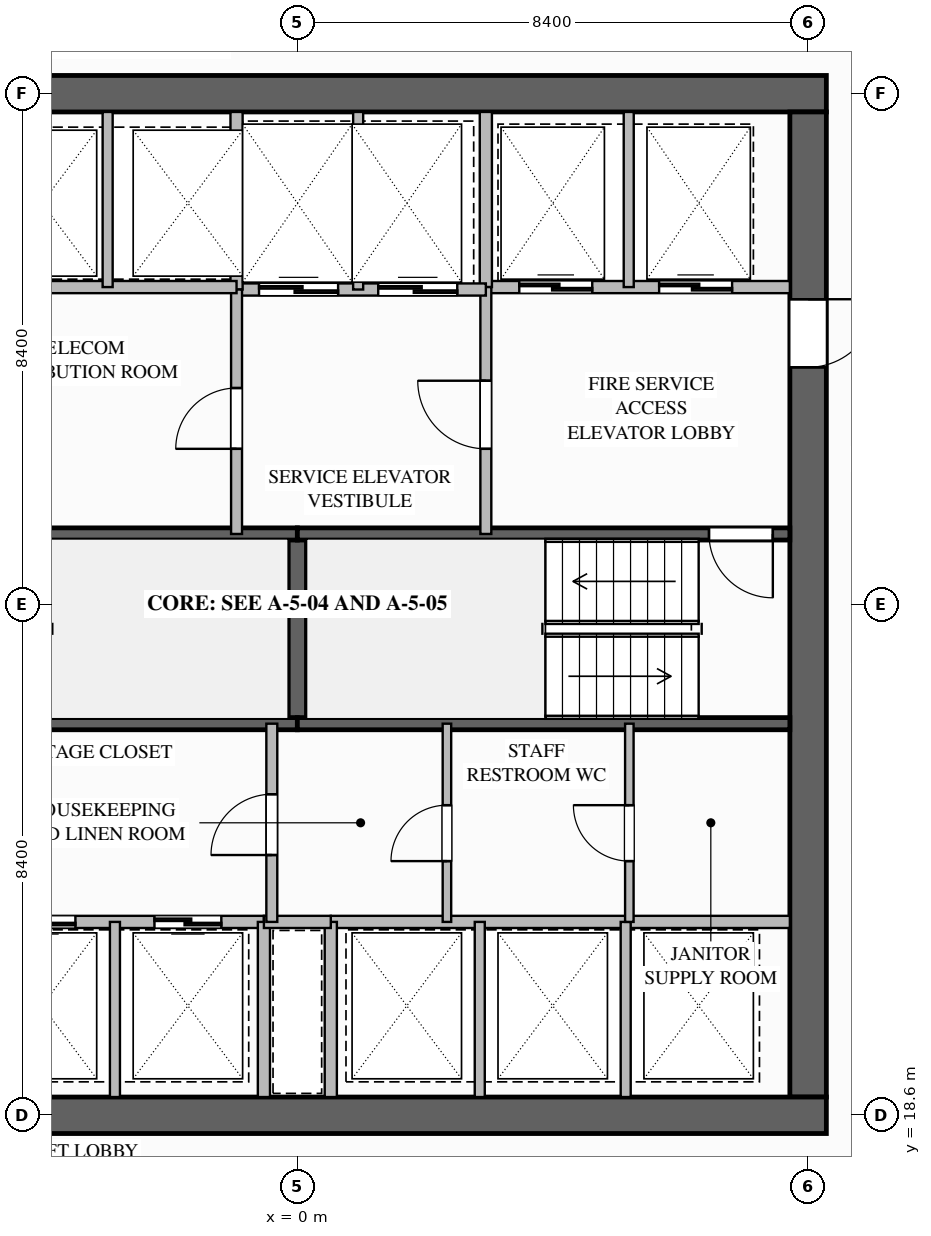
"""IFC4 building model, lengths in metres.
Left out: names, types, materials, properties, quantities, classifications, styles, units other than length and angle.
Written with IfcOpenShell. Run it as: python <this file> out.ifc"""

import sys

from ifc_helpers import new_model, si_unit, direction, frame, frame_2d, origin, place, context, subcontext, project, spatial, rectangle, extrude, element, fill, save


model = new_model("IFC4")
c1 = context("Model", 3, precision=1e-05, world=origin(), true_north=direction((0.0, 1.0)))
c2 = subcontext(c1, "Body", "Model", "MODEL_VIEW")
j1 = project(units=[si_unit("LENGTHUNIT", "METRE"), si_unit("PLANEANGLEUNIT", "RADIAN")], contexts=[c1])
p1 = place(None, origin())
s1 = spatial("IfcSite", under=j1, at=p1, CompositionType="ELEMENT")
p2 = place(p1, origin())
s2 = spatial("IfcBuilding", under=s1, at=p2, CompositionType="ELEMENT")
p3 = place(p2, frame((0.0, 0.0, 36.7)))
s3 = spatial("IfcBuildingStorey", under=s2, at=p3, CompositionType="ELEMENT", Elevation=36.7)
p4 = place(p3, frame((-8.7, 35.4, 0.0), z_axis=(0.0, 0.0, 1.0), x_axis=(1.0, 0.0, 0.0)))
e1 = element("IfcWall", 1, at=p4, inside=s3, PredefinedType="SHEAR", context=c2, shape_type="SweptSolid", body=[
    extrude(rectangle(XDim=17.4, YDim=0.6, at=frame_2d((8.7, 0.0))), origin(), (0.0, 0.0, 1.0), 3.5),
])
p5 = place(p3, frame((8.4, 35.1, 0.0), z_axis=(0.0, 0.0, 1.0), x_axis=(0.0, -1.0, 0.0)))
e2 = element("IfcWall", 2, at=p5, inside=s3, PredefinedType="SHEAR", context=c2, shape_type="SweptSolid", body=[
    extrude(rectangle(XDim=16.2, YDim=0.6, at=frame_2d((8.1, 0.0))), origin(), (0.0, 0.0, 1.0), 3.5),
])
p6 = place(p5, frame((3.08, 0.0, 0.0)))
e3 = element("IfcOpeningElement", 3, at=p6, cuts=e2, PredefinedType="OPENING", context=c2, shape_type="SweptSolid", body=[
    extrude(rectangle(XDim=1.12, YDim=2.1, at=frame_2d((0.56, 1.05))), frame((0.0, 0.31, 0.0), z_axis=(0.0, -1.0, 0.0), x_axis=(1.0, 0.0, 0.0)), (0.0, 0.0, 1.0), 0.62),
])
p7 = place(p3, frame((8.7, 18.6, 0.0), z_axis=(0.0, 0.0, 1.0), x_axis=(-1.0, 0.0, 0.0)))
e4 = element("IfcWall", 4, at=p7, inside=s3, PredefinedType="SHEAR", context=c2, shape_type="SweptSolid", body=[
    extrude(rectangle(XDim=17.4, YDim=0.6, at=frame_2d((8.7, 0.0))), origin(), (0.0, 0.0, 1.0), 3.5),
])
p8 = place(p3, frame((0.0, 25.04, 0.0), z_axis=(0.0, 0.0, 1.0), x_axis=(0.0, 1.0, 0.0)))
e5 = element("IfcWall", 5, at=p8, inside=s3, PredefinedType="SOLIDWALL", context=c2, shape_type="SweptSolid", body=[
    extrude(rectangle(XDim=3.12, YDim=0.3, at=frame_2d((1.56, 0.0))), origin(), (0.0, 0.0, 1.0), 3.24),
])
p9 = place(p3, frame((-8.1, 25.04, 0.0), z_axis=(0.0, 0.0, 1.0), x_axis=(1.0, 0.0, 0.0)))
e6 = element("IfcWall", 6, at=p9, inside=s3, PredefinedType="SOLIDWALL", context=c2, shape_type="SweptSolid", body=[
    extrude(rectangle(XDim=8.1, YDim=0.2, at=frame_2d((4.05, 0.0))), origin(), (0.0, 0.0, 1.0), 3.24),
])
p10 = place(p9, frame((0.28, 0.0, 0.0)))
e7 = element("IfcOpeningElement", 7, at=p10, cuts=e6, PredefinedType="OPENING", context=c2, shape_type="SweptSolid", body=[
    extrude(rectangle(XDim=1.05, YDim=2.1, at=frame_2d((0.525, 1.05))), frame((0.0, 0.11, 0.0), z_axis=(0.0, -1.0, 0.0), x_axis=(1.0, 0.0, 0.0)), (0.0, 0.0, 1.0), 0.22),
])
for number, where, z_axis, x_axis in (
    (8, (-8.1, 28.16, 0.0), (0.0, 0.0, 1.0), (1.0, 0.0, 0.0)),
    (9, (0.0, 25.04, 0.0), (0.0, 0.0, 1.0), (1.0, 0.0, 0.0)),
):
    element("IfcWall", number, at=place(p3, frame(where, z_axis=z_axis, x_axis=x_axis)), inside=s3, PredefinedType="SOLIDWALL", context=c2, shape_type="SweptSolid", body=[
        extrude(rectangle(XDim=8.1, YDim=0.2, at=frame_2d((4.05, 0.0))), origin(), (0.0, 0.0, 1.0), 3.24),
    ])
p11 = place(p3, frame((8.1, 28.16, 0.0), z_axis=(0.0, 0.0, 1.0), x_axis=(-1.0, 0.0, 0.0)))
e10 = element("IfcWall", 10, at=p11, inside=s3, PredefinedType="SOLIDWALL", context=c2, shape_type="SweptSolid", body=[
    extrude(rectangle(XDim=8.1, YDim=0.2, at=frame_2d((4.05, 0.0))), origin(), (0.0, 0.0, 1.0), 3.24),
])
p12 = place(p11, frame((0.28, 0.0, 0.0)))
e11 = element("IfcOpeningElement", 11, at=p12, cuts=e10, PredefinedType="OPENING", context=c2, shape_type="SweptSolid", body=[
    extrude(rectangle(XDim=1.05, YDim=2.1, at=frame_2d((0.525, 1.05))), frame((0.0, 0.11, 0.0), z_axis=(0.0, -1.0, 0.0), x_axis=(1.0, 0.0, 0.0)), (0.0, 0.0, 1.0), 0.22),
])
p13 = place(p3, frame((3.1, 32.22, 0.0), z_axis=(0.0, 0.0, 1.0), x_axis=(1.0, 0.0, 0.0)))
e12 = element("IfcWall", 12, at=p13, inside=s3, PredefinedType="SOLIDWALL", context=c2, shape_type="SweptSolid", body=[
    extrude(rectangle(XDim=5.0, YDim=0.2, at=frame_2d((2.5, 0.0))), origin(), (0.0, 0.0, 1.0), 3.24),
])
p14 = place(p13, frame((0.55, 0.0, 0.0)))
e13 = element("IfcOpeningElement", 13, at=p14, cuts=e12, PredefinedType="OPENING", context=c2, shape_type="SweptSolid", body=[
    extrude(rectangle(XDim=1.2, YDim=2.2, at=frame_2d((0.6, 1.1))), frame((0.0, 0.11, 0.0), z_axis=(0.0, -1.0, 0.0), x_axis=(1.0, 0.0, 0.0)), (0.0, 0.0, 1.0), 0.22),
])
p15 = place(p13, frame((2.85, 0.0, 0.0)))
e14 = element("IfcOpeningElement", 14, at=p15, cuts=e12, PredefinedType="OPENING", context=c2, shape_type="SweptSolid", body=[
    extrude(rectangle(XDim=1.2, YDim=2.2, at=frame_2d((0.6, 1.1))), frame((0.0, 0.11, 0.0), z_axis=(0.0, -1.0, 0.0), x_axis=(1.0, 0.0, 0.0)), (0.0, 0.0, 1.0), 0.22),
])
p16 = place(p3, frame((3.1, 32.22, 0.0), z_axis=(0.0, 0.0, 1.0), x_axis=(0.0, 1.0, 0.0)))
e15 = element("IfcWall", 15, at=p16, inside=s3, PredefinedType="SOLIDWALL", context=c2, shape_type="SweptSolid", body=[
    extrude(rectangle(XDim=2.88, YDim=0.2, at=frame_2d((1.44, 0.0))), origin(), (0.0, 0.0, 1.0), 3.24),
])
p17 = place(p3, frame((5.45, 32.22, 0.0), z_axis=(0.0, 0.0, 1.0), x_axis=(0.0, 1.0, 0.0)))
e16 = element("IfcWall", 16, at=p17, inside=s3, PredefinedType="PARTITIONING", context=c2, shape_type="SweptSolid", body=[
    extrude(rectangle(XDim=2.88, YDim=0.165, at=frame_2d((1.44, 0.0))), origin(), (0.0, 0.0, 1.0), 3.24),
])
p18 = place(p3, frame((3.1, 28.16, 0.0), z_axis=(0.0, 0.0, 1.0), x_axis=(0.0, 1.0, 0.0)))
e17 = element("IfcWall", 17, at=p18, inside=s3, PredefinedType="SOLIDWALL", context=c2, shape_type="SweptSolid", body=[
    extrude(rectangle(XDim=4.06, YDim=0.18, at=frame_2d((2.03, 0.0))), origin(), (0.0, 0.0, 1.0), 3.24),
])
p19 = place(p18, frame((1.4, 0.0, 0.0)))
e18 = element("IfcOpeningElement", 18, at=p19, cuts=e17, PredefinedType="OPENING", context=c2, shape_type="SweptSolid", body=[
    extrude(rectangle(XDim=1.12, YDim=2.1, at=frame_2d((0.56, 1.05))), frame((0.0, 0.1, 0.0), z_axis=(0.0, -1.0, 0.0), x_axis=(1.0, 0.0, 0.0)), (0.0, 0.0, 1.0), 0.2),
])
p20 = place(p3, frame((-1.0, 32.18, 0.0), z_axis=(0.0, 0.0, 1.0), x_axis=(1.0, 0.0, 0.0)))
e19 = element("IfcWall", 19, at=p20, inside=s3, PredefinedType="SOLIDWALL", context=c2, shape_type="SweptSolid", body=[
    extrude(rectangle(XDim=4.1, YDim=0.2, at=frame_2d((2.05, 0.0))), origin(), (0.0, 0.0, 1.0), 3.24),
])
p21 = place(p20, frame((0.37, 0.0, 0.0)))
e20 = element("IfcOpeningElement", 20, at=p21, cuts=e19, PredefinedType="OPENING", context=c2, shape_type="SweptSolid", body=[
    extrude(rectangle(XDim=1.3, YDim=2.2, at=frame_2d((0.65, 1.1))), frame((0.0, 0.11, 0.0), z_axis=(0.0, -1.0, 0.0), x_axis=(1.0, 0.0, 0.0)), (0.0, 0.0, 1.0), 0.22),
])
p22 = place(p20, frame((2.33, 0.0, 0.0)))
e21 = element("IfcOpeningElement", 21, at=p22, cuts=e19, PredefinedType="OPENING", context=c2, shape_type="SweptSolid", body=[
    extrude(rectangle(XDim=1.3, YDim=2.2, at=frame_2d((0.65, 1.1))), frame((0.0, 0.11, 0.0), z_axis=(0.0, -1.0, 0.0), x_axis=(1.0, 0.0, 0.0)), (0.0, 0.0, 1.0), 0.22),
])
p23 = place(p3, frame((-1.0, 32.18, 0.0), z_axis=(0.0, 0.0, 1.0), x_axis=(0.0, 1.0, 0.0)))
e22 = element("IfcWall", 22, at=p23, inside=s3, PredefinedType="SOLIDWALL", context=c2, shape_type="SweptSolid", body=[
    extrude(rectangle(XDim=2.92, YDim=0.2, at=frame_2d((1.46, 0.0))), origin(), (0.0, 0.0, 1.0), 3.24),
])
p24 = place(p3, frame((1.0, 32.18, 0.0), z_axis=(0.0, 0.0, 1.0), x_axis=(0.0, 1.0, 0.0)))
e23 = element("IfcWall", 23, at=p24, inside=s3, PredefinedType="PARTITIONING", context=c2, shape_type="SweptSolid", body=[
    extrude(rectangle(XDim=2.92, YDim=0.165, at=frame_2d((1.46, 0.0))), origin(), (0.0, 0.0, 1.0), 3.24),
])
p25 = place(p3, frame((-1.0, 28.16, 0.0), z_axis=(0.0, 0.0, 1.0), x_axis=(0.0, 1.0, 0.0)))
e24 = element("IfcWall", 24, at=p25, inside=s3, PredefinedType="SOLIDWALL", context=c2, shape_type="SweptSolid", body=[
    extrude(rectangle(XDim=4.02, YDim=0.18, at=frame_2d((2.01, 0.0))), origin(), (0.0, 0.0, 1.0), 3.24),
])
p26 = place(p25, frame((1.4, 0.0, 0.0)))
e25 = element("IfcOpeningElement", 25, at=p26, cuts=e24, PredefinedType="OPENING", context=c2, shape_type="SweptSolid", body=[
    extrude(rectangle(XDim=1.0, YDim=2.1, at=frame_2d((0.5, 1.05))), frame((0.0, 0.1, 0.0), z_axis=(0.0, -1.0, 0.0), x_axis=(1.0, 0.0, 0.0)), (0.0, 0.0, 1.0), 0.2),
])
p27 = place(p3, frame((-8.1, 32.22, 0.0), z_axis=(0.0, 0.0, 1.0), x_axis=(1.0, 0.0, 0.0)))
e26 = element("IfcWall", 26, at=p27, inside=s3, PredefinedType="SOLIDWALL", context=c2, shape_type="SweptSolid", body=[
    extrude(rectangle(XDim=7.1, YDim=0.2, at=frame_2d((3.55, 0.0))), origin(), (0.0, 0.0, 1.0), 3.24),
])
p28 = place(p3, frame((-3.12, 32.22, 0.0), z_axis=(0.0, 0.0, 1.0), x_axis=(0.0, 1.0, 0.0)))
e27 = element("IfcWall", 27, at=p28, inside=s3, PredefinedType="PARTITIONING", context=c2, shape_type="SweptSolid", body=[
    extrude(rectangle(XDim=2.88, YDim=0.165, at=frame_2d((1.44, 0.0))), origin(), (0.0, 0.0, 1.0), 3.24),
])
p29 = place(p3, frame((-0.55, 21.78, 0.0), z_axis=(0.0, 0.0, 1.0), x_axis=(-1.0, 0.0, 0.0)))
e28 = element("IfcWall", 28, at=p29, inside=s3, PredefinedType="SOLIDWALL", context=c2, shape_type="SweptSolid", body=[
    extrude(rectangle(XDim=7.55, YDim=0.2, at=frame_2d((3.775, 0.0))), origin(), (0.0, 0.0, 1.0), 3.24),
])
p30 = place(p29, frame((5.5, 0.0, 0.0)))
e29 = element("IfcOpeningElement", 29, at=p30, cuts=e28, PredefinedType="OPENING", context=c2, shape_type="SweptSolid", body=[
    extrude(rectangle(XDim=1.1, YDim=2.2, at=frame_2d((0.55, 1.1))), frame((0.0, 0.11, 0.0), z_axis=(0.0, -1.0, 0.0), x_axis=(1.0, 0.0, 0.0)), (0.0, 0.0, 1.0), 0.22),
])
p31 = place(p29, frame((3.1, 0.0, 0.0)))
e30 = element("IfcOpeningElement", 30, at=p31, cuts=e28, PredefinedType="OPENING", context=c2, shape_type="SweptSolid", body=[
    extrude(rectangle(XDim=1.1, YDim=2.2, at=frame_2d((0.55, 1.1))), frame((0.0, 0.11, 0.0), z_axis=(0.0, -1.0, 0.0), x_axis=(1.0, 0.0, 0.0)), (0.0, 0.0, 1.0), 0.22),
])
p32 = place(p29, frame((0.7, 0.0, 0.0)))
e31 = element("IfcOpeningElement", 31, at=p32, cuts=e28, PredefinedType="OPENING", context=c2, shape_type="SweptSolid", body=[
    extrude(rectangle(XDim=1.1, YDim=2.2, at=frame_2d((0.55, 1.1))), frame((0.0, 0.11, 0.0), z_axis=(0.0, -1.0, 0.0), x_axis=(1.0, 0.0, 0.0)), (0.0, 0.0, 1.0), 0.22),
])
p33 = place(p3, frame((-3.0, 18.9, 0.0), z_axis=(0.0, 0.0, 1.0), x_axis=(0.0, 1.0, 0.0)))
e32 = element("IfcWall", 32, at=p33, inside=s3, PredefinedType="PARTITIONING", context=c2, shape_type="SweptSolid", body=[
    extrude(rectangle(XDim=2.88, YDim=0.165, at=frame_2d((1.44, 0.0))), origin(), (0.0, 0.0, 1.0), 3.24),
])
p34 = place(p3, frame((-0.55, 18.9, 0.0), z_axis=(0.0, 0.0, 1.0), x_axis=(0.0, 1.0, 0.0)))
e33 = element("IfcWall", 33, at=p34, inside=s3, PredefinedType="SOLIDWALL", context=c2, shape_type="SweptSolid", body=[
    extrude(rectangle(XDim=2.88, YDim=0.2, at=frame_2d((1.44, 0.0))), origin(), (0.0, 0.0, 1.0), 3.24),
])
p35 = place(p3, frame((8.1, 21.78, 0.0), z_axis=(0.0, 0.0, 1.0), x_axis=(-1.0, 0.0, 0.0)))
e34 = element("IfcWall", 34, at=p35, inside=s3, PredefinedType="SOLIDWALL", context=c2, shape_type="SweptSolid", body=[
    extrude(rectangle(XDim=7.55, YDim=0.2, at=frame_2d((3.775, 0.0))), origin(), (0.0, 0.0, 1.0), 3.24),
])
p36 = place(p3, frame((0.55, 18.9, 0.0), z_axis=(0.0, 0.0, 1.0), x_axis=(0.0, 1.0, 0.0)))
e35 = element("IfcWall", 35, at=p36, inside=s3, PredefinedType="SOLIDWALL", context=c2, shape_type="SweptSolid", body=[
    extrude(rectangle(XDim=2.88, YDim=0.2, at=frame_2d((1.44, 0.0))), origin(), (0.0, 0.0, 1.0), 3.24),
])
for number, where, z_axis, x_axis in (
    (36, (3.0, 18.9, 0.0), (0.0, 0.0, 1.0), (0.0, 1.0, 0.0)),
    (37, (5.4, 18.9, 0.0), (0.0, 0.0, 1.0), (0.0, 1.0, 0.0)),
):
    element("IfcWall", number, at=place(p3, frame(where, z_axis=z_axis, x_axis=x_axis)), inside=s3, PredefinedType="PARTITIONING", context=c2, shape_type="SweptSolid", body=[
        extrude(rectangle(XDim=2.88, YDim=0.165, at=frame_2d((1.44, 0.0))), origin(), (0.0, 0.0, 1.0), 3.24),
    ])
p37 = place(p3, frame((-0.55, 21.78, 0.0), z_axis=(0.0, 0.0, 1.0), x_axis=(1.0, 0.0, 0.0)))
e38 = element("IfcWall", 38, at=p37, inside=s3, PredefinedType="SOLIDWALL", context=c2, shape_type="SweptSolid", body=[
    extrude(rectangle(XDim=1.1, YDim=0.2, at=frame_2d((0.55, 0.0))), origin(), (0.0, 0.0, 1.0), 3.24),
])
p38 = place(p3, frame((-0.42, 21.78, 0.0), z_axis=(0.0, 0.0, 1.0), x_axis=(0.0, 1.0, 0.0)))
e39 = element("IfcWall", 39, at=p38, inside=s3, PredefinedType="SOLIDWALL", context=c2, shape_type="SweptSolid", body=[
    extrude(rectangle(XDim=3.26, YDim=0.18, at=frame_2d((1.63, 0.0))), origin(), (0.0, 0.0, 1.0), 3.24),
])
p39 = place(p38, frame((1.1, 0.0, 0.0)))
e40 = element("IfcOpeningElement", 40, at=p39, cuts=e39, PredefinedType="OPENING", context=c2, shape_type="SweptSolid", body=[
    extrude(rectangle(XDim=1.0, YDim=2.1, at=frame_2d((0.5, 1.05))), frame((0.0, 0.1, 0.0), z_axis=(0.0, -1.0, 0.0), x_axis=(1.0, 0.0, 0.0)), (0.0, 0.0, 1.0), 0.2),
])
p40 = place(p3, frame((2.46, 21.78, 0.0), z_axis=(0.0, 0.0, 1.0), x_axis=(0.0, 1.0, 0.0)))
e41 = element("IfcWall", 41, at=p40, inside=s3, PredefinedType="PLUMBINGWALL", context=c2, shape_type="SweptSolid", body=[
    extrude(rectangle(XDim=3.26, YDim=0.14, at=frame_2d((1.63, 0.0))), origin(), (0.0, 0.0, 1.0), 3.24),
])
p41 = place(p40, frame((1.0, 0.0, 0.0)))
e42 = element("IfcOpeningElement", 42, at=p41, cuts=e41, PredefinedType="OPENING", context=c2, shape_type="SweptSolid", body=[
    extrude(rectangle(XDim=0.92, YDim=2.1, at=frame_2d((0.46, 1.05))), frame((0.0, 0.08, 0.0), z_axis=(0.0, -1.0, 0.0), x_axis=(1.0, 0.0, 0.0)), (0.0, 0.0, 1.0), 0.16),
])
p42 = place(p3, frame((5.46, 21.78, 0.0), z_axis=(0.0, 0.0, 1.0), x_axis=(0.0, 1.0, 0.0)))
e43 = element("IfcWall", 43, at=p42, inside=s3, PredefinedType="PLUMBINGWALL", context=c2, shape_type="SweptSolid", body=[
    extrude(rectangle(XDim=3.26, YDim=0.14, at=frame_2d((1.63, 0.0))), origin(), (0.0, 0.0, 1.0), 3.24),
])
p43 = place(p42, frame((1.0, 0.0, 0.0)))
e44 = element("IfcOpeningElement", 44, at=p43, cuts=e43, PredefinedType="OPENING", context=c2, shape_type="SweptSolid", body=[
    extrude(rectangle(XDim=0.92, YDim=2.1, at=frame_2d((0.46, 1.05))), frame((0.0, 0.08, 0.0), z_axis=(0.0, -1.0, 0.0), x_axis=(1.0, 0.0, 0.0)), (0.0, 0.0, 1.0), 0.16),
])
p44 = place(p12, origin())
e45 = element("IfcDoor", 45, at=p44, inside=s3, OperationType="SINGLE_SWING_LEFT", PredefinedType="DOOR", context=c2, shape_type="SweptSolid", body=[
    extrude(rectangle(XDim=1.05, YDim=2.1, at=frame_2d((0.525, 1.05))), frame((0.0, 0.025, 0.0), z_axis=(0.0, -1.0, 0.0), x_axis=(1.0, 0.0, 0.0)), (0.0, 0.0, 1.0), 0.05),
])
fill(e11, e45)
p45 = place(p14, origin())
e46 = element("IfcDoor", 46, at=p45, inside=s3, OperationType="SLIDING_TO_LEFT", PredefinedType="DOOR", context=c2, shape_type="SweptSolid", body=[
    extrude(rectangle(XDim=1.2, YDim=2.2, at=frame_2d((0.6, 1.1))), frame((0.0, 0.025, 0.0), z_axis=(0.0, -1.0, 0.0), x_axis=(1.0, 0.0, 0.0)), (0.0, 0.0, 1.0), 0.05),
])
fill(e13, e46)
p46 = place(p15, origin())
e47 = element("IfcDoor", 47, at=p46, inside=s3, OperationType="SLIDING_TO_LEFT", PredefinedType="DOOR", context=c2, shape_type="SweptSolid", body=[
    extrude(rectangle(XDim=1.2, YDim=2.2, at=frame_2d((0.6, 1.1))), frame((0.0, 0.025, 0.0), z_axis=(0.0, -1.0, 0.0), x_axis=(1.0, 0.0, 0.0)), (0.0, 0.0, 1.0), 0.05),
])
fill(e14, e47)
p47 = place(p19, origin())
e48 = element("IfcDoor", 48, at=p47, inside=s3, OperationType="SINGLE_SWING_RIGHT", PredefinedType="DOOR", context=c2, shape_type="SweptSolid", body=[
    extrude(rectangle(XDim=1.12, YDim=2.1, at=frame_2d((0.56, 1.05))), frame((0.0, 0.025, 0.0), z_axis=(0.0, -1.0, 0.0), x_axis=(1.0, 0.0, 0.0)), (0.0, 0.0, 1.0), 0.05),
])
fill(e18, e48)
p48 = place(p6, origin())
e49 = element("IfcDoor", 49, at=p48, inside=s3, OperationType="SINGLE_SWING_LEFT", PredefinedType="DOOR", context=c2, shape_type="SweptSolid", body=[
    extrude(rectangle(XDim=1.12, YDim=2.1, at=frame_2d((0.56, 1.05))), frame((0.0, 0.025, 0.0), z_axis=(0.0, -1.0, 0.0), x_axis=(1.0, 0.0, 0.0)), (0.0, 0.0, 1.0), 0.05),
])
fill(e3, e49)
p49 = place(p21, origin())
e50 = element("IfcDoor", 50, at=p49, inside=s3, OperationType="SLIDING_TO_LEFT", PredefinedType="DOOR", context=c2, shape_type="SweptSolid", body=[
    extrude(rectangle(XDim=1.3, YDim=2.2, at=frame_2d((0.65, 1.1))), frame((0.0, 0.025, 0.0), z_axis=(0.0, -1.0, 0.0), x_axis=(1.0, 0.0, 0.0)), (0.0, 0.0, 1.0), 0.05),
])
fill(e20, e50)
p50 = place(p22, origin())
e51 = element("IfcDoor", 51, at=p50, inside=s3, OperationType="SLIDING_TO_LEFT", PredefinedType="DOOR", context=c2, shape_type="SweptSolid", body=[
    extrude(rectangle(XDim=1.3, YDim=2.2, at=frame_2d((0.65, 1.1))), frame((0.0, 0.025, 0.0), z_axis=(0.0, -1.0, 0.0), x_axis=(1.0, 0.0, 0.0)), (0.0, 0.0, 1.0), 0.05),
])
fill(e21, e51)
p51 = place(p26, origin())
e52 = element("IfcDoor", 52, at=p51, inside=s3, OperationType="SINGLE_SWING_LEFT", PredefinedType="DOOR", context=c2, shape_type="SweptSolid", body=[
    extrude(rectangle(XDim=1.0, YDim=2.1, at=frame_2d((0.5, 1.05))), frame((0.0, 0.025, 0.0), z_axis=(0.0, -1.0, 0.0), x_axis=(1.0, 0.0, 0.0)), (0.0, 0.0, 1.0), 0.05),
])
fill(e25, e52)
p52 = place(p31, origin())
e53 = element("IfcDoor", 53, at=p52, inside=s3, OperationType="SLIDING_TO_LEFT", PredefinedType="DOOR", context=c2, shape_type="SweptSolid", body=[
    extrude(rectangle(XDim=1.1, YDim=2.2, at=frame_2d((0.55, 1.1))), frame((0.0, 0.025, 0.0), z_axis=(0.0, -1.0, 0.0), x_axis=(1.0, 0.0, 0.0)), (0.0, 0.0, 1.0), 0.05),
])
fill(e30, e53)
p53 = place(p32, origin())
e54 = element("IfcDoor", 54, at=p53, inside=s3, OperationType="SLIDING_TO_LEFT", PredefinedType="DOOR", context=c2, shape_type="SweptSolid", body=[
    extrude(rectangle(XDim=1.1, YDim=2.2, at=frame_2d((0.55, 1.1))), frame((0.0, 0.025, 0.0), z_axis=(0.0, -1.0, 0.0), x_axis=(1.0, 0.0, 0.0)), (0.0, 0.0, 1.0), 0.05),
])
fill(e31, e54)
p54 = place(p39, origin())
e55 = element("IfcDoor", 55, at=p54, inside=s3, OperationType="SINGLE_SWING_LEFT", PredefinedType="DOOR", context=c2, shape_type="SweptSolid", body=[
    extrude(rectangle(XDim=1.0, YDim=2.1, at=frame_2d((0.5, 1.05))), frame((0.0, 0.025, 0.0), z_axis=(0.0, -1.0, 0.0), x_axis=(1.0, 0.0, 0.0)), (0.0, 0.0, 1.0), 0.05),
])
fill(e40, e55)
p55 = place(p41, origin())
e56 = element("IfcDoor", 56, at=p55, inside=s3, OperationType="SINGLE_SWING_LEFT", PredefinedType="DOOR", context=c2, shape_type="SweptSolid", body=[
    extrude(rectangle(XDim=0.92, YDim=2.1, at=frame_2d((0.46, 1.05))), frame((0.0, 0.025, 0.0), z_axis=(0.0, -1.0, 0.0), x_axis=(1.0, 0.0, 0.0)), (0.0, 0.0, 1.0), 0.05),
])
fill(e42, e56)
p56 = place(p43, origin())
e57 = element("IfcDoor", 57, at=p56, inside=s3, OperationType="SINGLE_SWING_RIGHT", PredefinedType="DOOR", context=c2, shape_type="SweptSolid", body=[
    extrude(rectangle(XDim=0.92, YDim=2.1, at=frame_2d((0.46, 1.05))), frame((0.0, 0.025, 0.0), z_axis=(0.0, -1.0, 0.0), x_axis=(1.0, 0.0, 0.0)), (0.0, 0.0, 1.0), 0.05),
])
fill(e44, e57)
save(model, sys.argv[1])
